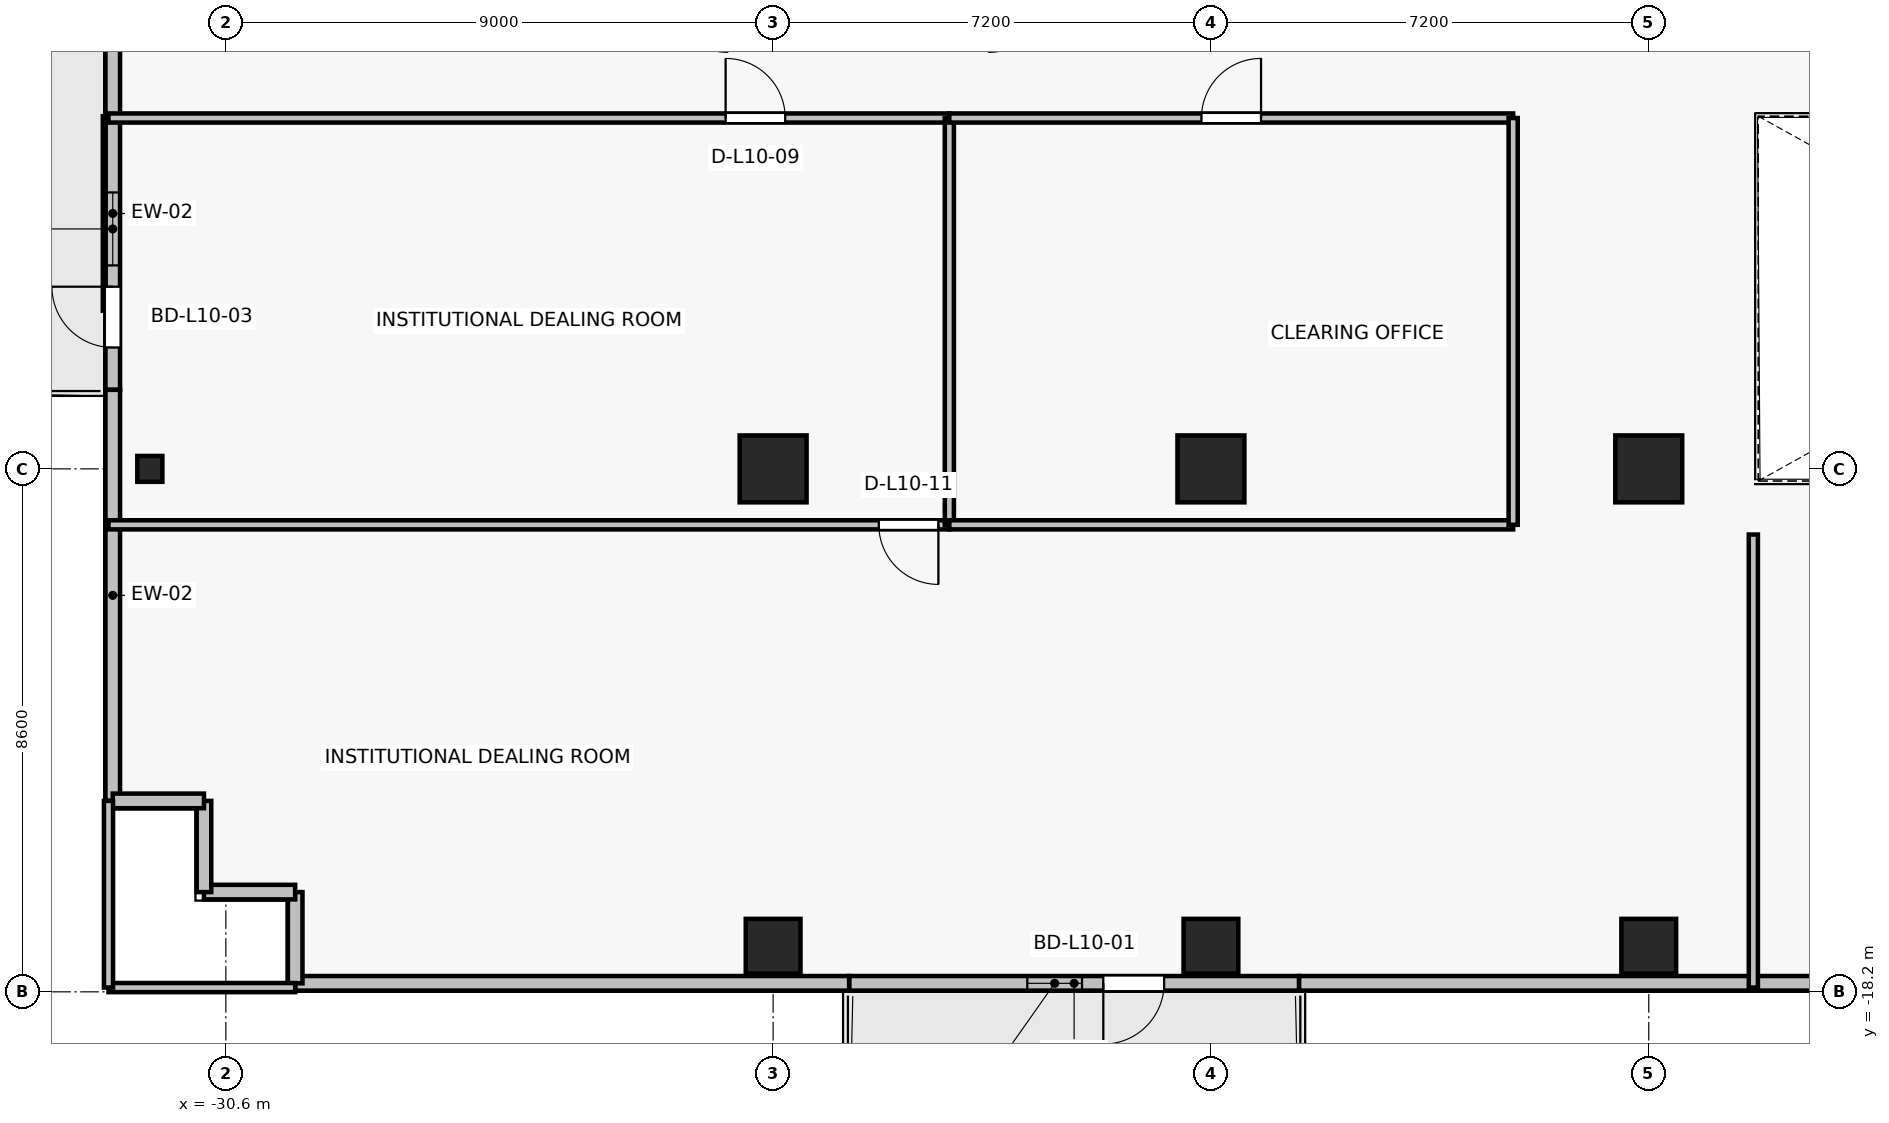
"""IFC4 building model, lengths in metres.
Left out: names, types, materials, properties, quantities, classifications, styles, units other than length and angle.
Written with IfcOpenShell. Run it as: python <this file> out.ifc"""

import sys

from ifc_helpers import new_model, si_unit, direction, frame, frame_2d, origin, origin_2d, place, context, subcontext, project, spatial, rectangle, i_section, extrude, source, transform, mapped, element, fill, save


model = new_model("IFC4")
c1 = context("Model", 3, precision=1e-05, world=origin(), true_north=direction((0.0, 1.0)))
c2 = subcontext(c1, "Body", "Model", "MODEL_VIEW")
j1 = project(units=[si_unit("LENGTHUNIT", "METRE"), si_unit("PLANEANGLEUNIT", "RADIAN")], contexts=[c1])
p1 = place(None, origin())
s1 = spatial("IfcSite", under=j1, at=p1, CompositionType="ELEMENT")
p2 = place(p1, origin())
s2 = spatial("IfcBuilding", under=s1, at=p2, CompositionType="ELEMENT")
p3 = place(p2, frame((0.0, 0.0, 40.6)))
s3 = spatial("IfcBuildingStorey", under=s2, at=p3, CompositionType="ELEMENT", Elevation=40.6)
for number, where, z_axis, x_axis in (
    (1, (-14.4, -9.6, 0.0), (0.0, 0.0, 1.0), (1.0, 0.0, 0.0)),
    (2, (-7.2, -9.6, 0.0), (0.0, 0.0, 1.0), (1.0, 0.0, 0.0)),
    (3, (-21.6, -9.6, 0.0), (0.0, 0.0, 1.0), (1.0, 0.0, 0.0)),
):
    element("IfcColumn", number, at=place(p3, frame(where, z_axis=z_axis, x_axis=x_axis)), inside=s3, PredefinedType="COLUMN", context=c2, shape_type="SweptSolid", body=[
        extrude(rectangle(XDim=1.1, YDim=1.1, at=origin_2d()), origin(), (0.0, 0.0, 1.0), 3.3),
    ])
for number, where, z_axis, x_axis in (
    (4, (-14.4, -17.45, 0.0), (0.0, 0.0, 1.0), (1.0, 0.0, 0.0)),
    (5, (-7.2, -17.45, 0.0), (0.0, 0.0, 1.0), (1.0, 0.0, 0.0)),
    (6, (-21.6, -17.45, 0.0), (0.0, 0.0, 1.0), (1.0, 0.0, 0.0)),
):
    element("IfcColumn", number, at=place(p3, frame(where, z_axis=z_axis, x_axis=x_axis)), inside=s3, PredefinedType="COLUMN", context=c2, shape_type="SweptSolid", body=[
        extrude(rectangle(XDim=0.9, YDim=0.9, at=origin_2d()), origin(), (0.0, 0.0, 1.0), 3.3),
    ])
p4 = place(p3, frame((-31.85, -9.6, 0.0), z_axis=(0.0, 0.0, 1.0), x_axis=(1.0, 0.0, 0.0)))
e7 = element("IfcColumn", 7, at=p4, inside=s3, PredefinedType="COLUMN", context=c2, shape_type="SweptSolid", body=[
    extrude(i_section(OverallWidth=0.412, OverallDepth=0.425, WebThickness=0.026, FlangeThickness=0.039, FilletRadius=0.015, at=origin_2d()), origin(), (0.0, 0.0, 1.0), 3.3),
])
p5 = place(p3, frame((-12.95, -18.06, 0.0), z_axis=(0.0, 0.0, 1.0), x_axis=(-1.0, 0.0, 0.0)))
e8 = element("IfcWall", 8, at=p5, inside=s3, PredefinedType="SOLIDWALL", context=c2, shape_type="SweptSolid", body=[
    extrude(rectangle(XDim=7.4, YDim=0.24, at=frame_2d((3.7, 0.0))), origin(), (0.0, 0.0, 1.0), 2.665),
])
p6 = place(p5, frame((2.22, 0.0, 0.0)))
e9 = element("IfcOpeningElement", 9, at=p6, cuts=e8, PredefinedType="OPENING", context=c2, shape_type="SweptSolid", body=[
    extrude(rectangle(XDim=1.0, YDim=2.2, at=frame_2d((0.5, 1.1))), frame((0.0, 0.13, 0.0), z_axis=(0.0, -1.0, 0.0), x_axis=(1.0, 0.0, 0.0)), (0.0, 0.0, 1.0), 0.26),
])
p7 = place(p5, frame((3.57, 0.0, 0.85)))
e10 = element("IfcOpeningElement", 10, at=p7, cuts=e8, PredefinedType="OPENING", context=c2, shape_type="SweptSolid", body=[
    extrude(rectangle(XDim=0.9, YDim=1.35, at=frame_2d((0.45, 0.675))), frame((0.0, 0.13, 0.0), z_axis=(0.0, -1.0, 0.0), x_axis=(1.0, 0.0, 0.0)), (0.0, 0.0, 1.0), 0.26),
])
p8 = place(p3, frame((-32.46, -8.3, 0.0), z_axis=(0.0, 0.0, 1.0), x_axis=(0.0, 1.0, 0.0)))
e11 = element("IfcWall", 11, at=p8, inside=s3, PredefinedType="SOLIDWALL", context=c2, shape_type="SweptSolid", body=[
    extrude(rectangle(XDim=5.8, YDim=0.24, at=frame_2d((2.9, 0.0))), origin(), (0.0, 0.0, 1.0), 3.075),
])
p9 = place(p8, frame((0.696, 0.0, 0.0)))
e12 = element("IfcOpeningElement", 12, at=p9, cuts=e11, PredefinedType="OPENING", context=c2, shape_type="SweptSolid", body=[
    extrude(rectangle(XDim=1.0, YDim=2.2, at=frame_2d((0.5, 1.1))), frame((0.0, 0.13, 0.0), z_axis=(0.0, -1.0, 0.0), x_axis=(1.0, 0.0, 0.0)), (0.0, 0.0, 1.0), 0.26),
])
p10 = place(p8, frame((2.046, 0.0, 0.85)))
e13 = element("IfcOpeningElement", 13, at=p10, cuts=e11, PredefinedType="OPENING", context=c2, shape_type="SweptSolid", body=[
    extrude(rectangle(XDim=1.2, YDim=1.5, at=frame_2d((0.6, 0.75))), frame((0.0, 0.13, 0.0), z_axis=(0.0, -1.0, 0.0), x_axis=(1.0, 0.0, 0.0)), (0.0, 0.0, 1.0), 0.26),
])
p11 = place(p3, frame((-32.46, -8.3, 0.0), z_axis=(0.0, 0.0, 1.0), x_axis=(0.0, -1.0, 0.0)))
e14 = element("IfcWall", 14, at=p11, inside=s3, PredefinedType="SOLIDWALL", context=c2, shape_type="SweptSolid", body=[
    extrude(rectangle(XDim=6.76, YDim=0.24, at=frame_2d((3.38, 0.0))), origin(), (0.0, 0.0, 1.0), 3.075),
])
p12 = place(p3, frame((-12.95, -18.06, 0.0), z_axis=(0.0, 0.0, 1.0), x_axis=(1.0, 0.0, 0.0)))
e15 = element("IfcWall", 15, at=p12, inside=s3, PredefinedType="SOLIDWALL", context=c2, shape_type="SweptSolid", body=[
    extrude(rectangle(XDim=9.61, YDim=0.24, at=frame_2d((4.805, 0.0))), origin(), (0.0, 0.0, 1.0), 2.665),
])
p13 = place(p3, frame((-29.46, -18.06, 0.0), z_axis=(0.0, 0.0, 1.0), x_axis=(1.0, 0.0, 0.0)))
e16 = element("IfcWall", 16, at=p13, inside=s3, PredefinedType="SOLIDWALL", context=c2, shape_type="SweptSolid", body=[
    extrude(rectangle(XDim=9.11, YDim=0.24, at=frame_2d((4.555, 0.0))), origin(), (0.0, 0.0, 1.0), 3.075),
])
for number, where, z_axis, x_axis in (
    (17, (-29.46, -16.56, 0.0), (0.0, 0.0, 1.0), (0.0, -1.0, 0.0)),
    (18, (-30.96, -16.56, 0.0), (0.0, 0.0, 1.0), (1.0, 0.0, 0.0)),
    (19, (-30.96, -15.06, 0.0), (0.0, 0.0, 1.0), (0.0, -1.0, 0.0)),
    (20, (-32.46, -15.06, 0.0), (0.0, 0.0, 1.0), (1.0, 0.0, 0.0)),
):
    element("IfcWall", number, at=place(p3, frame(where, z_axis=z_axis, x_axis=x_axis)), inside=s3, PredefinedType="SOLIDWALL", context=c2, shape_type="SweptSolid", body=[
        extrude(rectangle(XDim=1.5, YDim=0.24, at=frame_2d((0.75, 0.0))), origin(), (0.0, 0.0, 1.0), 3.075),
    ])
p14 = place(p3, frame((-18.702, -10.52, 0.0), z_axis=(0.0, 0.0, 1.0), x_axis=(-1.0, 0.0, 0.0)))
e21 = element("IfcWall", 21, at=p14, inside=s3, PredefinedType="PARTITIONING", context=c2, shape_type="SweptSolid", body=[
    extrude(rectangle(XDim=13.828, YDim=0.15, at=frame_2d((6.914, 0.0))), origin(), (0.0, 0.0, 1.0), 2.465),
])
p15 = place(p14, frame((0.18, 0.0, 0.0)))
e22 = element("IfcOpeningElement", 22, at=p15, cuts=e21, PredefinedType="OPENING", context=c2, shape_type="SweptSolid", body=[
    extrude(rectangle(XDim=0.98, YDim=2.15, at=frame_2d((0.49, 1.075))), frame((0.0, 0.085, 0.0), z_axis=(0.0, -1.0, 0.0), x_axis=(1.0, 0.0, 0.0)), (0.0, 0.0, 1.0), 0.17),
])
p16 = place(p3, frame((-32.53, -3.83, 0.0), z_axis=(0.0, 0.0, 1.0), x_axis=(1.0, 0.0, 0.0)))
e23 = element("IfcWall", 23, at=p16, inside=s3, PredefinedType="PARTITIONING", context=c2, shape_type="SweptSolid", body=[
    extrude(rectangle(XDim=13.828, YDim=0.15, at=frame_2d((6.914, 0.0))), origin(), (0.0, 0.0, 1.0), 2.465),
])
p17 = place(p16, frame((10.149, 0.0, 0.0)))
e24 = element("IfcOpeningElement", 24, at=p17, cuts=e23, PredefinedType="OPENING", context=c2, shape_type="SweptSolid", body=[
    extrude(rectangle(XDim=0.98, YDim=2.15, at=frame_2d((0.49, 1.075))), frame((0.0, 0.085, 0.0), z_axis=(0.0, -1.0, 0.0), x_axis=(1.0, 0.0, 0.0)), (0.0, 0.0, 1.0), 0.17),
])
p18 = place(p3, frame((-18.702, -3.83, 0.0), z_axis=(0.0, 0.0, 1.0), x_axis=(0.0, -1.0, 0.0)))
e25 = element("IfcWall", 25, at=p18, inside=s3, PredefinedType="PARTITIONING", context=c2, shape_type="SweptSolid", body=[
    extrude(rectangle(XDim=6.69, YDim=0.15, at=frame_2d((3.345, 0.0))), origin(), (0.0, 0.0, 1.0), 2.465),
])
p19 = place(p3, frame((-9.43, -10.52, 0.0), z_axis=(0.0, 0.0, 1.0), x_axis=(-1.0, 0.0, 0.0)))
e26 = element("IfcWall", 26, at=p19, inside=s3, PredefinedType="PARTITIONING", context=c2, shape_type="SweptSolid", body=[
    extrude(rectangle(XDim=9.272, YDim=0.15, at=frame_2d((4.636, 0.0))), origin(), (0.0, 0.0, 1.0), 2.465),
])
p20 = place(p3, frame((-18.702, -3.83, 0.0), z_axis=(0.0, 0.0, 1.0), x_axis=(1.0, 0.0, 0.0)))
e27 = element("IfcWall", 27, at=p20, inside=s3, PredefinedType="PARTITIONING", context=c2, shape_type="SweptSolid", body=[
    extrude(rectangle(XDim=9.272, YDim=0.15, at=frame_2d((4.636, 0.0))), origin(), (0.0, 0.0, 1.0), 2.465),
])
p21 = place(p20, frame((4.146, 0.0, 0.0)))
e28 = element("IfcOpeningElement", 28, at=p21, cuts=e27, PredefinedType="OPENING", context=c2, shape_type="SweptSolid", body=[
    extrude(rectangle(XDim=0.98, YDim=2.15, at=frame_2d((0.49, 1.075))), frame((0.0, 0.085, 0.0), z_axis=(0.0, -1.0, 0.0), x_axis=(1.0, 0.0, 0.0)), (0.0, 0.0, 1.0), 0.17),
])
p22 = place(p3, frame((-9.43, -3.83, 0.0), z_axis=(0.0, 0.0, 1.0), x_axis=(0.0, -1.0, 0.0)))
e29 = element("IfcWall", 29, at=p22, inside=s3, PredefinedType="PARTITIONING", context=c2, shape_type="SweptSolid", body=[
    extrude(rectangle(XDim=6.69, YDim=0.15, at=frame_2d((3.345, 0.0))), origin(), (0.0, 0.0, 1.0), 2.465),
])
p23 = place(p3, frame((-29.46, -18.13, 0.0), z_axis=(0.0, 0.0, 1.0), x_axis=(-1.0, 0.0, 0.0)))
e30 = element("IfcWall", 30, at=p23, inside=s3, PredefinedType="PARTITIONING", context=c2, shape_type="SweptSolid", body=[
    extrude(rectangle(XDim=3.07, YDim=0.15, at=frame_2d((1.535, 0.0))), origin(), (0.0, 0.0, 1.0), 2.665),
])
p24 = place(p3, frame((-32.53, -18.13, 0.0), z_axis=(0.0, 0.0, 1.0), x_axis=(0.0, 1.0, 0.0)))
e31 = element("IfcWall", 31, at=p24, inside=s3, PredefinedType="PARTITIONING", context=c2, shape_type="SweptSolid", body=[
    extrude(rectangle(XDim=3.07, YDim=0.15, at=frame_2d((1.535, 0.0))), origin(), (0.0, 0.0, 1.0), 3.075),
])
p25 = place(p3, frame((-5.48, -10.68, 0.0), z_axis=(0.0, 0.0, 1.0), x_axis=(0.0, -1.0, 0.0)))
e32 = element("IfcWall", 32, at=p25, inside=s3, PredefinedType="PARTITIONING", context=c2, shape_type="SweptSolid", body=[
    extrude(rectangle(XDim=7.45, YDim=0.15, at=frame_2d((3.725, 0.0))), origin(), (0.0, 0.0, 1.0), 2.465),
])
m1 = source(origin(), c2, "Body", "SweptSolid", [
    extrude(rectangle(XDim=1.0, YDim=2.2, at=frame_2d((0.5, 1.1))), frame((0.0, 0.025, 0.0), z_axis=(0.0, -1.0, 0.0), x_axis=(1.0, 0.0, 0.0)), (0.0, 0.0, 1.0), 0.05),
])
p26 = place(p6, origin())
e33 = element("IfcDoor", 33, at=p26, inside=s3, OperationType="SINGLE_SWING_RIGHT", PredefinedType="DOOR", context=c2, shape_type="MappedRepresentation", body=[
    mapped(m1, transform((0.0, 0.0, 0.0), x_axis=(1.0, 0.0, 0.0), y_axis=(0.0, 1.0, 0.0), z_axis=(0.0, 0.0, 1.0), scale=1.0)),
])
fill(e9, e33)
m2 = source(origin(), c2, "Body", "SweptSolid", [
    extrude(rectangle(XDim=0.9, YDim=1.35, at=frame_2d((0.45, 0.675))), frame((0.0, 0.03, 0.0), z_axis=(0.0, -1.0, 0.0), x_axis=(1.0, 0.0, 0.0)), (0.0, 0.0, 1.0), 0.06),
])
p27 = place(p7, origin())
e34 = element("IfcWindow", 34, at=p27, inside=s3, PartitioningType="SINGLE_PANEL", PredefinedType="WINDOW", context=c2, shape_type="MappedRepresentation", body=[
    mapped(m2, transform((0.0, 0.0, 0.0), x_axis=(1.0, 0.0, 0.0), y_axis=(0.0, 1.0, 0.0), z_axis=(0.0, 0.0, 1.0), scale=1.0)),
])
fill(e10, e34)
p28 = place(p9, origin())
e35 = element("IfcDoor", 35, at=p28, inside=s3, OperationType="SINGLE_SWING_RIGHT", PredefinedType="DOOR", context=c2, shape_type="MappedRepresentation", body=[
    mapped(m1, transform((0.0, 0.0, 0.0), x_axis=(1.0, 0.0, 0.0), y_axis=(0.0, 1.0, 0.0), z_axis=(0.0, 0.0, 1.0), scale=1.0)),
])
fill(e12, e35)
m3 = source(origin(), c2, "Body", "SweptSolid", [
    extrude(rectangle(XDim=1.2, YDim=1.5, at=frame_2d((0.6, 0.75))), frame((0.0, 0.03, 0.0), z_axis=(0.0, -1.0, 0.0), x_axis=(1.0, 0.0, 0.0)), (0.0, 0.0, 1.0), 0.06),
])
p29 = place(p10, origin())
e36 = element("IfcWindow", 36, at=p29, inside=s3, PartitioningType="SINGLE_PANEL", PredefinedType="WINDOW", context=c2, shape_type="MappedRepresentation", body=[
    mapped(m3, transform((0.0, 0.0, 0.0), x_axis=(1.0, 0.0, 0.0), y_axis=(0.0, 1.0, 0.0), z_axis=(0.0, 0.0, 1.0), scale=1.0)),
])
fill(e13, e36)
m4 = source(origin(), c2, "Body", "SweptSolid", [
    extrude(rectangle(XDim=0.98, YDim=2.15, at=frame_2d((0.49, 1.075))), frame((0.0, 0.025, 0.0), z_axis=(0.0, -1.0, 0.0), x_axis=(1.0, 0.0, 0.0)), (0.0, 0.0, 1.0), 0.05),
])
p30 = place(p17, origin())
e37 = element("IfcDoor", 37, at=p30, inside=s3, OperationType="SINGLE_SWING_LEFT", PredefinedType="DOOR", context=c2, shape_type="MappedRepresentation", body=[
    mapped(m4, transform((0.0, 0.0, 0.0), x_axis=(1.0, 0.0, 0.0), y_axis=(0.0, 1.0, 0.0), z_axis=(0.0, 0.0, 1.0), scale=1.0)),
])
fill(e24, e37)
p31 = place(p21, origin())
e38 = element("IfcDoor", 38, at=p31, inside=s3, OperationType="SINGLE_SWING_RIGHT", PredefinedType="DOOR", context=c2, shape_type="MappedRepresentation", body=[
    mapped(m4, transform((0.0, 0.0, 0.0), x_axis=(1.0, 0.0, 0.0), y_axis=(0.0, 1.0, 0.0), z_axis=(0.0, 0.0, 1.0), scale=1.0)),
])
fill(e28, e38)
p32 = place(p15, origin())
e39 = element("IfcDoor", 39, at=p32, inside=s3, OperationType="SINGLE_SWING_LEFT", PredefinedType="DOOR", context=c2, shape_type="MappedRepresentation", body=[
    mapped(m4, transform((0.0, 0.0, 0.0), x_axis=(1.0, 0.0, 0.0), y_axis=(0.0, 1.0, 0.0), z_axis=(0.0, 0.0, 1.0), scale=1.0)),
])
fill(e22, e39)
save(model, sys.argv[1])
